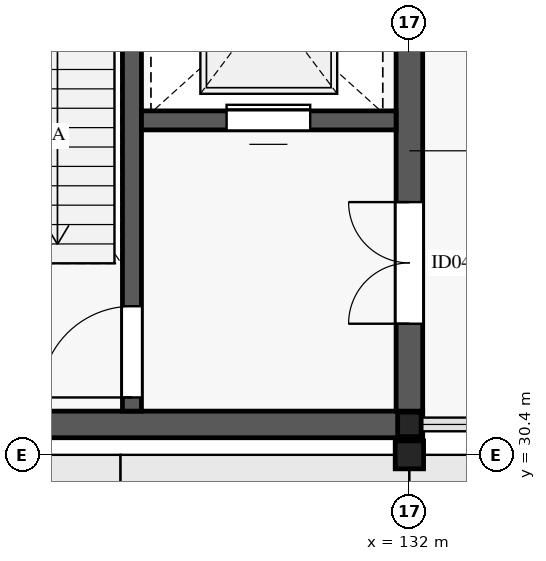
"""IFC4 building model, lengths in metres.
Left out: names, types, materials, properties, quantities, classifications, styles, units other than length and angle.
Written with IfcOpenShell. Run it as: python <this file> out.ifc"""

import sys

from ifc_helpers import new_model, si_unit, direction, frame, frame_2d, origin, origin_2d, place, context, subcontext, project, spatial, rectangle, i_section, extrude, element, fill, save


model = new_model("IFC4")
c1 = context("Model", 3, precision=1e-05, world=origin(), true_north=direction((0.0, 1.0)))
c2 = subcontext(c1, "Body", "Model", "MODEL_VIEW")
j1 = project(units=[si_unit("LENGTHUNIT", "METRE"), si_unit("PLANEANGLEUNIT", "RADIAN")], contexts=[c1])
p1 = place(None, origin())
s1 = spatial("IfcSite", under=j1, at=p1, CompositionType="ELEMENT")
p2 = place(p1, origin())
s2 = spatial("IfcBuilding", under=s1, at=p2, CompositionType="ELEMENT")
p3 = place(p2, frame((0.0, 0.0, 20.4)))
s3 = spatial("IfcBuildingStorey", under=s2, at=p3, CompositionType="ELEMENT", Elevation=20.4)
p4 = place(p3, frame((132.0, 30.8, 0.0), z_axis=(0.0, 0.0, 1.0), x_axis=(1.0, 0.0, 0.0)))
e1 = element("IfcColumn", 1, at=p4, inside=s3, PredefinedType="COLUMN", context=c2, shape_type="SweptSolid", body=[
    extrude(i_section(OverallWidth=0.309, OverallDepth=0.323, WebThickness=0.014, FlangeThickness=0.023, FilletRadius=0.015, at=origin_2d()), origin(), (0.0, 0.0, 1.0), 4.545),
])
p5 = place(p3, frame((132.0, 30.4, -0.195), z_axis=(0.0, 0.0, 1.0), x_axis=(1.0, 0.0, 0.0)))
e2 = element("IfcColumn", 2, at=p5, inside=s3, PredefinedType="COLUMN", context=c2, shape_type="SweptSolid", body=[
    extrude(i_section(OverallWidth=0.373, OverallDepth=0.368, WebThickness=0.015, FlangeThickness=0.024, FilletRadius=0.015, at=origin_2d()), origin(), (0.0, 0.0, 1.0), 0.68),
])
p6 = place(p3, frame((124.225, 30.8, 0.0), z_axis=(0.0, 0.0, 1.0), x_axis=(1.0, 0.0, 0.0)))
e3 = element("IfcWall", 3, at=p6, inside=s3, PredefinedType="SHEAR", context=c2, shape_type="SweptSolid", body=[
    extrude(rectangle(XDim=7.95, YDim=0.35, at=frame_2d((3.975, 0.0))), origin(), (0.0, 0.0, 1.0), 4.545),
])
p7 = place(p3, frame((132.0, 30.975, 0.0), z_axis=(0.0, 0.0, 1.0), x_axis=(0.0, 1.0, 0.0)))
e4 = element("IfcWall", 4, at=p7, inside=s3, PredefinedType="SHEAR", context=c2, shape_type="SweptSolid", body=[
    extrude(rectangle(XDim=6.85, YDim=0.35, at=frame_2d((3.425, 0.0))), origin(), (0.0, 0.0, 1.0), 4.545),
])
p8 = place(p7, frame((1.15, 0.0, 0.0)))
e5 = element("IfcOpeningElement", 5, at=p8, cuts=e4, PredefinedType="OPENING", context=c2, shape_type="SweptSolid", body=[
    extrude(rectangle(XDim=1.6, YDim=2.35, at=frame_2d((0.8, 1.175))), frame((0.0, 0.185, 0.0), z_axis=(0.0, -1.0, 0.0), x_axis=(1.0, 0.0, 0.0)), (0.0, 0.0, 1.0), 0.37),
])
p9 = place(p3, frame((128.35, 30.975, 0.0), z_axis=(0.0, 0.0, 1.0), x_axis=(0.0, 1.0, 0.0)))
e6 = element("IfcWall", 6, at=p9, inside=s3, PredefinedType="SHEAR", context=c2, shape_type="SweptSolid", body=[
    extrude(rectangle(XDim=6.85, YDim=0.25, at=frame_2d((3.425, 0.0))), origin(), (0.0, 0.0, 1.0), 4.545),
])
p10 = place(p9, frame((0.18, 0.0, 0.0)))
e7 = element("IfcOpeningElement", 7, at=p10, cuts=e6, PredefinedType="OPENING", context=c2, shape_type="SweptSolid", body=[
    extrude(rectangle(XDim=1.2, YDim=2.2, at=frame_2d((0.6, 1.1))), frame((0.0, 0.135, 0.0), z_axis=(0.0, -1.0, 0.0), x_axis=(1.0, 0.0, 0.0)), (0.0, 0.0, 1.0), 0.27),
])
p11 = place(p3, frame((128.475, 34.8, 0.0), z_axis=(0.0, 0.0, 1.0), x_axis=(1.0, 0.0, 0.0)))
e8 = element("IfcWall", 8, at=p11, inside=s3, PredefinedType="SHEAR", context=c2, shape_type="SweptSolid", body=[
    extrude(rectangle(XDim=3.35, YDim=0.25, at=frame_2d((1.675, 0.0))), origin(), (0.0, 0.0, 1.0), 4.545),
])
p12 = place(p11, frame((1.12, 0.0, 0.0)))
e9 = element("IfcOpeningElement", 9, at=p12, cuts=e8, PredefinedType="OPENING", context=c2, shape_type="SweptSolid", body=[
    extrude(rectangle(XDim=1.1, YDim=2.2, at=frame_2d((0.55, 1.1))), frame((0.0, 0.135, 0.0), z_axis=(0.0, -1.0, 0.0), x_axis=(1.0, 0.0, 0.0)), (0.0, 0.0, 1.0), 0.27),
])
p13 = place(p10, origin())
e10 = element("IfcDoor", 10, at=p13, inside=s3, OperationType="SINGLE_SWING_LEFT", PredefinedType="DOOR", context=c2, shape_type="SweptSolid", body=[
    extrude(rectangle(XDim=1.2, YDim=2.2, at=frame_2d((0.6, 1.1))), frame((0.0, 0.025, 0.0), z_axis=(0.0, -1.0, 0.0), x_axis=(1.0, 0.0, 0.0)), (0.0, 0.0, 1.0), 0.05),
])
fill(e7, e10)
p14 = place(p8, origin())
e11 = element("IfcDoor", 11, at=p14, inside=s3, OperationType="DOUBLE_DOOR_SINGLE_SWING", PredefinedType="DOOR", context=c2, shape_type="SweptSolid", body=[
    extrude(rectangle(XDim=1.6, YDim=2.35, at=frame_2d((0.8, 1.175))), frame((0.0, 0.025, 0.0), z_axis=(0.0, -1.0, 0.0), x_axis=(1.0, 0.0, 0.0)), (0.0, 0.0, 1.0), 0.05),
])
fill(e5, e11)
p15 = place(p12, origin())
e12 = element("IfcDoor", 12, at=p15, inside=s3, OperationType="SLIDING_TO_LEFT", PredefinedType="DOOR", context=c2, shape_type="SweptSolid", body=[
    extrude(rectangle(XDim=1.1, YDim=2.2, at=frame_2d((0.55, 1.1))), frame((0.0, 0.025, 0.0), z_axis=(0.0, -1.0, 0.0), x_axis=(1.0, 0.0, 0.0)), (0.0, 0.0, 1.0), 0.05),
])
fill(e9, e12)
save(model, sys.argv[1])
